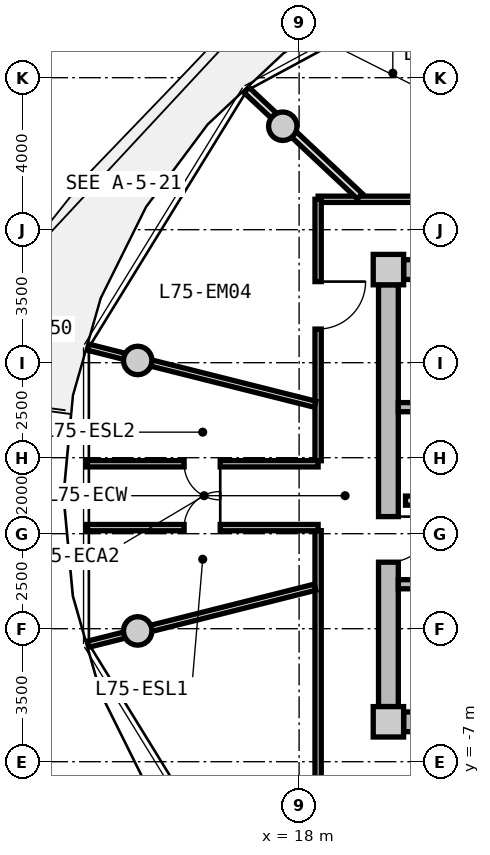
"""IFC4 building model, lengths in metres.
Left out: names, types, materials, properties, quantities, classifications, styles, units other than length and angle.
Written with IfcOpenShell. Run it as: python <this file> out.ifc"""

import sys

from ifc_helpers import new_model, si_unit, direction, frame, frame_2d, origin, origin_2d, place, context, subcontext, project, spatial, rectangle, circle, extrude, source, transform, mapped, element, fill, save


model = new_model("IFC4")
c1 = context("Model", 3, precision=1e-05, world=origin(), true_north=direction((0.0, 1.0)))
c2 = subcontext(c1, "Body", "Model", "MODEL_VIEW")
j1 = project(units=[si_unit("LENGTHUNIT", "METRE"), si_unit("PLANEANGLEUNIT", "RADIAN")], contexts=[c1])
p1 = place(None, origin())
s1 = spatial("IfcSite", under=j1, at=p1, CompositionType="ELEMENT")
p2 = place(p1, origin())
s2 = spatial("IfcBuilding", under=s1, at=p2, CompositionType="ELEMENT")
p3 = place(p2, frame((0.0, 0.0, 241.35)))
s3 = spatial("IfcBuildingStorey", under=s2, at=p3, CompositionType="ELEMENT", Elevation=241.35)
m1 = source(origin(), c2, "Body", "SweptSolid", [
    extrude(rectangle(XDim=0.8, YDim=0.8, at=origin_2d()), origin(), (0.0, 0.0, 1.0), 3.05),
])
for number, where, z_axis, x_axis in (
    (1, (20.35, -5.95, 0.0), (0.0, 0.0, 1.0), (1.0, 0.0, 0.0)),
    (2, (20.35, 5.95, 0.0), (0.0, 0.0, 1.0), (1.0, 0.0, 0.0)),
):
    element("IfcColumn", number, at=place(p3, frame(where, z_axis=z_axis, x_axis=x_axis)), inside=s3, PredefinedType="COLUMN", context=c2, shape_type="MappedRepresentation", body=[
        mapped(m1, transform((0.0, 0.0, 0.0), x_axis=(1.0, 0.0, 0.0), y_axis=(0.0, 1.0, 0.0), z_axis=(0.0, 0.0, 1.0), scale=1.0)),
    ])
m2 = source(origin(), c2, "Body", "SweptSolid", [
    extrude(rectangle(XDim=14.5, YDim=0.52, at=frame_2d((7.25, 0.0))), origin(), (0.0, 0.0, 1.0), 2.73),
])
for number, where, z_axis, x_axis in (
    (3, (20.75, 5.95, 0.0), (0.0, 0.0, 1.0), (1.0, 0.0, 0.0)),
    (4, (35.25, -5.95, 0.0), (0.0, 0.0, 1.0), (-1.0, 0.0, 0.0)),
):
    element("IfcWall", number, at=place(p3, frame(where, z_axis=z_axis, x_axis=x_axis)), inside=s3, PredefinedType="SHEAR", context=c2, shape_type="MappedRepresentation", body=[
        mapped(m2, transform((0.0, 0.0, 0.0), x_axis=(1.0, 0.0, 0.0), y_axis=(0.0, 1.0, 0.0), z_axis=(0.0, 0.0, 1.0), scale=1.0)),
    ])
m3 = source(origin(), c2, "Body", "SweptSolid", [
    extrude(rectangle(XDim=11.1, YDim=0.52, at=frame_2d((5.55, 0.0))), origin(), (0.0, 0.0, 1.0), 2.73),
])
p4 = place(p3, frame((20.35, -5.55, 0.0), z_axis=(0.0, 0.0, 1.0), x_axis=(0.0, 1.0, 0.0)))
e5 = element("IfcWall", 5, at=p4, inside=s3, PredefinedType="SHEAR", context=c2, shape_type="MappedRepresentation", body=[
    mapped(m3, transform((0.0, 0.0, 0.0), x_axis=(1.0, 0.0, 0.0), y_axis=(0.0, 1.0, 0.0), z_axis=(0.0, 0.0, 1.0), scale=1.0)),
])
p5 = place(p4, frame((3.8, 0.0, 0.0)))
e6 = element("IfcOpeningElement", 6, at=p5, cuts=e5, PredefinedType="OPENING", context=c2, shape_type="SweptSolid", body=[
    extrude(rectangle(XDim=1.2, YDim=2.15, at=frame_2d((0.6, 1.075))), frame((0.0, 0.27, 0.0), z_axis=(0.0, -1.0, 0.0), x_axis=(1.0, 0.0, 0.0)), (0.0, 0.0, 1.0), 0.54),
])
m4 = source(origin(), c2, "Body", "SweptSolid", [
    extrude(circle(Radius=0.375, at=origin_2d()), origin(), (0.0, 0.0, 1.0), 3.05),
])
for number, where, z_axis, x_axis in (
    (7, (17.57, 9.723, 0.0), (0.0, 0.0, 1.0), (1.0, 0.0, 0.0)),
    (8, (13.753, 3.559, 0.0), (0.0, 0.0, 1.0), (1.0, 0.0, 0.0)),
    (9, (13.753, -3.559, 0.0), (0.0, 0.0, 1.0), (1.0, 0.0, 0.0)),
):
    element("IfcColumn", number, at=place(p3, frame(where, z_axis=z_axis, x_axis=x_axis)), inside=s3, PredefinedType="COLUMN", context=c2, shape_type="MappedRepresentation", body=[
        mapped(m4, transform((0.0, 0.0, 0.0), x_axis=(1.0, 0.0, 0.0), y_axis=(0.0, 1.0, 0.0), z_axis=(0.0, 0.0, 1.0), scale=1.0)),
    ])
m5 = source(origin(), c2, "Body", "SweptSolid", [
    extrude(rectangle(XDim=7.93, YDim=0.24, at=frame_2d((3.965, 0.0))), origin(), (0.0, 0.0, 1.0), 2.73),
])
p6 = place(p3, frame((20.61, 2.33, 0.0), z_axis=(0.0, 0.0, 1.0), x_axis=(1.0, 0.0, 0.0)))
e10 = element("IfcWall", 10, at=p6, inside=s3, PredefinedType="PARTITIONING", context=c2, shape_type="MappedRepresentation", body=[
    mapped(m5, transform((0.0, 0.0, 0.0), x_axis=(1.0, 0.0, 0.0), y_axis=(0.0, 1.0, 0.0), z_axis=(0.0, 0.0, 1.0), scale=1.0)),
])
p7 = place(p3, frame((20.61, -2.33, 0.0), z_axis=(0.0, 0.0, 1.0), x_axis=(1.0, 0.0, 0.0)))
e11 = element("IfcWall", 11, at=p7, inside=s3, PredefinedType="PARTITIONING", context=c2, shape_type="MappedRepresentation", body=[
    mapped(m5, transform((0.0, 0.0, 0.0), x_axis=(1.0, 0.0, 0.0), y_axis=(0.0, 1.0, 0.0), z_axis=(0.0, 0.0, 1.0), scale=1.0)),
])
p8 = place(p7, frame((1.05, 0.0, 0.0)))
e12 = element("IfcOpeningElement", 12, at=p8, cuts=e11, PredefinedType="OPENING", context=c2, shape_type="SweptSolid", body=[
    extrude(rectangle(XDim=1.1, YDim=2.15, at=frame_2d((0.55, 1.075))), frame((0.0, 0.13, 0.0), z_axis=(0.0, -1.0, 0.0), x_axis=(1.0, 0.0, 0.0)), (0.0, 0.0, 1.0), 0.26),
])
m6 = source(origin(), c2, "Body", "SweptSolid", [
    extrude(rectangle(XDim=7.62, YDim=0.24, at=frame_2d((3.81, 0.0))), origin(), (0.0, 0.0, 1.0), 2.715),
])
p9 = place(p3, frame((20.8, -0.13, 0.0), z_axis=(0.0, 0.0, 1.0), x_axis=(1.0, 0.0, 0.0)))
e13 = element("IfcWall", 13, at=p9, inside=s3, PredefinedType="PARTITIONING", context=c2, shape_type="MappedRepresentation", body=[
    mapped(m6, transform((0.0, 0.0, 0.0), x_axis=(1.0, 0.0, 0.0), y_axis=(0.0, 1.0, 0.0), z_axis=(0.0, 0.0, 1.0), scale=1.0)),
])
p10 = place(p9, frame((6.22, 0.0, 0.0)))
e14 = element("IfcOpeningElement", 14, at=p10, cuts=e13, PredefinedType="OPENING", context=c2, shape_type="SweptSolid", body=[
    extrude(rectangle(XDim=1.0, YDim=2.1, at=frame_2d((0.5, 1.05))), frame((0.0, 0.13, 0.0), z_axis=(0.0, -1.0, 0.0), x_axis=(1.0, 0.0, 0.0)), (0.0, 0.0, 1.0), 0.26),
])
p11 = place(p9, frame((2.4, 0.0, 0.0)))
e15 = element("IfcOpeningElement", 15, at=p11, cuts=e13, PredefinedType="OPENING", context=c2, shape_type="SweptSolid", body=[
    extrude(rectangle(XDim=1.0, YDim=2.1, at=frame_2d((0.5, 1.05))), frame((0.0, 0.13, 0.0), z_axis=(0.0, -1.0, 0.0), x_axis=(1.0, 0.0, 0.0)), (0.0, 0.0, 1.0), 0.26),
])
m7 = source(origin(), c2, "Body", "SweptSolid", [
    extrude(rectangle(XDim=8.58, YDim=0.165, at=frame_2d((4.29, 0.0))), origin(), (0.0, 0.0, 1.0), 2.715),
])
p12 = place(p3, frame((18.5, 7.8, 0.0), z_axis=(0.0, 0.0, 1.0), x_axis=(1.0, 0.0, 0.0)))
e16 = element("IfcWall", 16, at=p12, inside=s3, PredefinedType="PARTITIONING", context=c2, shape_type="MappedRepresentation", body=[
    mapped(m7, transform((0.0, 0.0, 0.0), x_axis=(1.0, 0.0, 0.0), y_axis=(0.0, 1.0, 0.0), z_axis=(0.0, 0.0, 1.0), scale=1.0)),
])
p13 = place(p12, frame((2.515, 0.0, 0.0)))
e17 = element("IfcOpeningElement", 17, at=p13, cuts=e16, PredefinedType="OPENING", context=c2, shape_type="SweptSolid", body=[
    extrude(rectangle(XDim=1.05, YDim=2.15, at=frame_2d((0.525, 1.075))), frame((0.0, 0.093, 0.0), z_axis=(0.0, -1.0, 0.0), x_axis=(1.0, 0.0, 0.0)), (0.0, 0.0, 1.0), 0.185),
])
m8 = source(origin(), c2, "Body", "SweptSolid", [
    extrude(rectangle(XDim=6.88, YDim=0.165, at=frame_2d((3.44, 0.0))), origin(), (0.0, 0.0, 1.0), 2.715),
])
p14 = place(p3, frame((18.5, -7.8, 0.0), z_axis=(0.0, 0.0, 1.0), x_axis=(0.0, 1.0, 0.0)))
e18 = element("IfcWall", 18, at=p14, inside=s3, PredefinedType="PARTITIONING", context=c2, shape_type="MappedRepresentation", body=[
    mapped(m8, transform((0.0, 0.0, 0.0), x_axis=(1.0, 0.0, 0.0), y_axis=(0.0, 1.0, 0.0), z_axis=(0.0, 0.0, 1.0), scale=1.0)),
])
p15 = place(p3, frame((18.5, 0.92, 0.0), z_axis=(0.0, 0.0, 1.0), x_axis=(0.0, 1.0, 0.0)))
e19 = element("IfcWall", 19, at=p15, inside=s3, PredefinedType="PARTITIONING", context=c2, shape_type="MappedRepresentation", body=[
    mapped(m8, transform((0.0, 0.0, 0.0), x_axis=(1.0, 0.0, 0.0), y_axis=(0.0, 1.0, 0.0), z_axis=(0.0, 0.0, 1.0), scale=1.0)),
])
p16 = place(p15, frame((3.464, 0.0, 0.0)))
e20 = element("IfcOpeningElement", 20, at=p16, cuts=e19, PredefinedType="OPENING", context=c2, shape_type="SweptSolid", body=[
    extrude(rectangle(XDim=1.25, YDim=2.2, at=frame_2d((0.625, 1.1))), frame((0.0, 0.093, 0.0), z_axis=(0.0, -1.0, 0.0), x_axis=(1.0, 0.0, 0.0)), (0.0, 0.0, 1.0), 0.185),
])
m9 = source(origin(), c2, "Body", "SweptSolid", [
    extrude(rectangle(XDim=6.157, YDim=0.165, at=frame_2d((3.079, 0.0))), origin(), (0.0, 0.0, 1.0), 2.315),
])
for number, where, z_axis, x_axis in (
    (21, (18.42, 2.407, 0.0), (0.0, 0.0, 1.0), (-0.97, 0.244, 0.0)),
    (22, (18.42, -2.407, 0.0), (0.0, 0.0, 1.0), (-0.97, -0.244, 0.0)),
):
    element("IfcWall", number, at=place(p3, frame(where, z_axis=z_axis, x_axis=x_axis)), inside=s3, PredefinedType="PARTITIONING", context=c2, shape_type="MappedRepresentation", body=[
        mapped(m9, transform((0.0, 0.0, 0.0), x_axis=(1.0, 0.0, 0.0), y_axis=(0.0, 1.0, 0.0), z_axis=(0.0, 0.0, 1.0), scale=1.0)),
    ])
m10 = source(origin(), c2, "Body", "SweptSolid", [
    extrude(rectangle(XDim=6.101, YDim=0.165, at=frame_2d((3.051, 0.0))), origin(), (0.0, 0.0, 1.0), 2.715),
])
p17 = place(p3, frame((12.399, 0.84, 0.0), z_axis=(0.0, 0.0, 1.0), x_axis=(1.0, 0.0, 0.0)))
e23 = element("IfcWall", 23, at=p17, inside=s3, PredefinedType="PARTITIONING", context=c2, shape_type="MappedRepresentation", body=[
    mapped(m10, transform((0.0, 0.0, 0.0), x_axis=(1.0, 0.0, 0.0), y_axis=(0.0, 1.0, 0.0), z_axis=(0.0, 0.0, 1.0), scale=1.0)),
])
p18 = place(p17, frame((2.576, 0.0, 0.0)))
e24 = element("IfcOpeningElement", 24, at=p18, cuts=e23, PredefinedType="OPENING", context=c2, shape_type="SweptSolid", body=[
    extrude(rectangle(XDim=0.95, YDim=2.1, at=frame_2d((0.475, 1.05))), frame((0.0, 0.093, 0.0), z_axis=(0.0, -1.0, 0.0), x_axis=(1.0, 0.0, 0.0)), (0.0, 0.0, 1.0), 0.185),
])
p19 = place(p3, frame((18.5, -0.84, 0.0), z_axis=(0.0, 0.0, 1.0), x_axis=(-1.0, 0.0, 0.0)))
e25 = element("IfcWall", 25, at=p19, inside=s3, PredefinedType="PARTITIONING", context=c2, shape_type="MappedRepresentation", body=[
    mapped(m10, transform((0.0, 0.0, 0.0), x_axis=(1.0, 0.0, 0.0), y_axis=(0.0, 1.0, 0.0), z_axis=(0.0, 0.0, 1.0), scale=1.0)),
])
p20 = place(p19, frame((2.576, 0.0, 0.0)))
e26 = element("IfcOpeningElement", 26, at=p20, cuts=e25, PredefinedType="OPENING", context=c2, shape_type="SweptSolid", body=[
    extrude(rectangle(XDim=0.95, YDim=2.1, at=frame_2d((0.475, 1.05))), frame((0.0, 0.093, 0.0), z_axis=(0.0, -1.0, 0.0), x_axis=(1.0, 0.0, 0.0)), (0.0, 0.0, 1.0), 0.185),
])
m11 = source(origin(), c2, "Body", "SweptSolid", [
    extrude(rectangle(XDim=4.089, YDim=0.19, at=frame_2d((2.044, 0.0))), origin(), (0.0, 0.0, 1.0), 2.315),
])
p21 = place(p3, frame((19.598, 7.88, 0.0), z_axis=(0.0, 0.0, 1.0), x_axis=(-0.729401273609, 0.684086092577, 0.0)))
e27 = element("IfcWall", 27, at=p21, inside=s3, PredefinedType="PARTITIONING", context=c2, shape_type="MappedRepresentation", body=[
    mapped(m11, transform((0.0, 0.0, 0.0), x_axis=(1.0, 0.0, 0.0), y_axis=(0.0, 1.0, 0.0), z_axis=(0.0, 0.0, 1.0), scale=1.0)),
])
m12 = source(origin(), c2, "Body", "SweptSolid", [
    extrude(rectangle(XDim=1.2, YDim=2.15, at=frame_2d((0.6, 1.075))), frame((0.0, 0.025, 0.0), z_axis=(0.0, -1.0, 0.0), x_axis=(1.0, 0.0, 0.0)), (0.0, 0.0, 1.0), 0.05),
])
p22 = place(p5, frame((1.2, 0.0, 0.0), z_axis=(0.0, 0.0, 1.0), x_axis=(-1.0, 0.0, 0.0)))
e28 = element("IfcDoor", 28, at=p22, inside=s3, OperationType="SINGLE_SWING_LEFT", PredefinedType="DOOR", context=c2, shape_type="MappedRepresentation", body=[
    mapped(m12, transform((0.0, 0.0, 0.0), x_axis=(1.0, 0.0, 0.0), y_axis=(0.0, 1.0, 0.0), z_axis=(0.0, 0.0, 1.0), scale=1.0)),
])
fill(e6, e28)
m13 = source(origin(), c2, "Body", "SweptSolid", [
    extrude(rectangle(XDim=0.95, YDim=2.1, at=frame_2d((0.475, 1.05))), frame((0.0, 0.025, 0.0), z_axis=(0.0, -1.0, 0.0), x_axis=(1.0, 0.0, 0.0)), (0.0, 0.0, 1.0), 0.05),
])
p23 = place(p20, frame((0.95, 0.0, 0.0), z_axis=(0.0, 0.0, 1.0), x_axis=(-1.0, 0.0, 0.0)))
e29 = element("IfcDoor", 29, at=p23, inside=s3, OperationType="SINGLE_SWING_RIGHT", PredefinedType="DOOR", context=c2, shape_type="MappedRepresentation", body=[
    mapped(m13, transform((0.0, 0.0, 0.0), x_axis=(1.0, 0.0, 0.0), y_axis=(0.0, 1.0, 0.0), z_axis=(0.0, 0.0, 1.0), scale=1.0)),
])
fill(e26, e29)
p24 = place(p18, frame((0.95, 0.0, 0.0), z_axis=(0.0, 0.0, 1.0), x_axis=(-1.0, 0.0, 0.0)))
e30 = element("IfcDoor", 30, at=p24, inside=s3, OperationType="SINGLE_SWING_LEFT", PredefinedType="DOOR", context=c2, shape_type="MappedRepresentation", body=[
    mapped(m13, transform((0.0, 0.0, 0.0), x_axis=(1.0, 0.0, 0.0), y_axis=(0.0, 1.0, 0.0), z_axis=(0.0, 0.0, 1.0), scale=1.0)),
])
fill(e24, e30)
m14 = source(origin(), c2, "Body", "SweptSolid", [
    extrude(rectangle(XDim=1.25, YDim=2.2, at=frame_2d((0.625, 1.1))), frame((0.0, 0.025, 0.0), z_axis=(0.0, -1.0, 0.0), x_axis=(1.0, 0.0, 0.0)), (0.0, 0.0, 1.0), 0.05),
])
p25 = place(p16, frame((1.25, 0.0, 0.0), z_axis=(0.0, 0.0, 1.0), x_axis=(-1.0, 0.0, 0.0)))
e31 = element("IfcDoor", 31, at=p25, inside=s3, OperationType="SINGLE_SWING_LEFT", PredefinedType="DOOR", context=c2, shape_type="MappedRepresentation", body=[
    mapped(m14, transform((0.0, 0.0, 0.0), x_axis=(1.0, 0.0, 0.0), y_axis=(0.0, 1.0, 0.0), z_axis=(0.0, 0.0, 1.0), scale=1.0)),
])
fill(e20, e31)
save(model, sys.argv[1])
